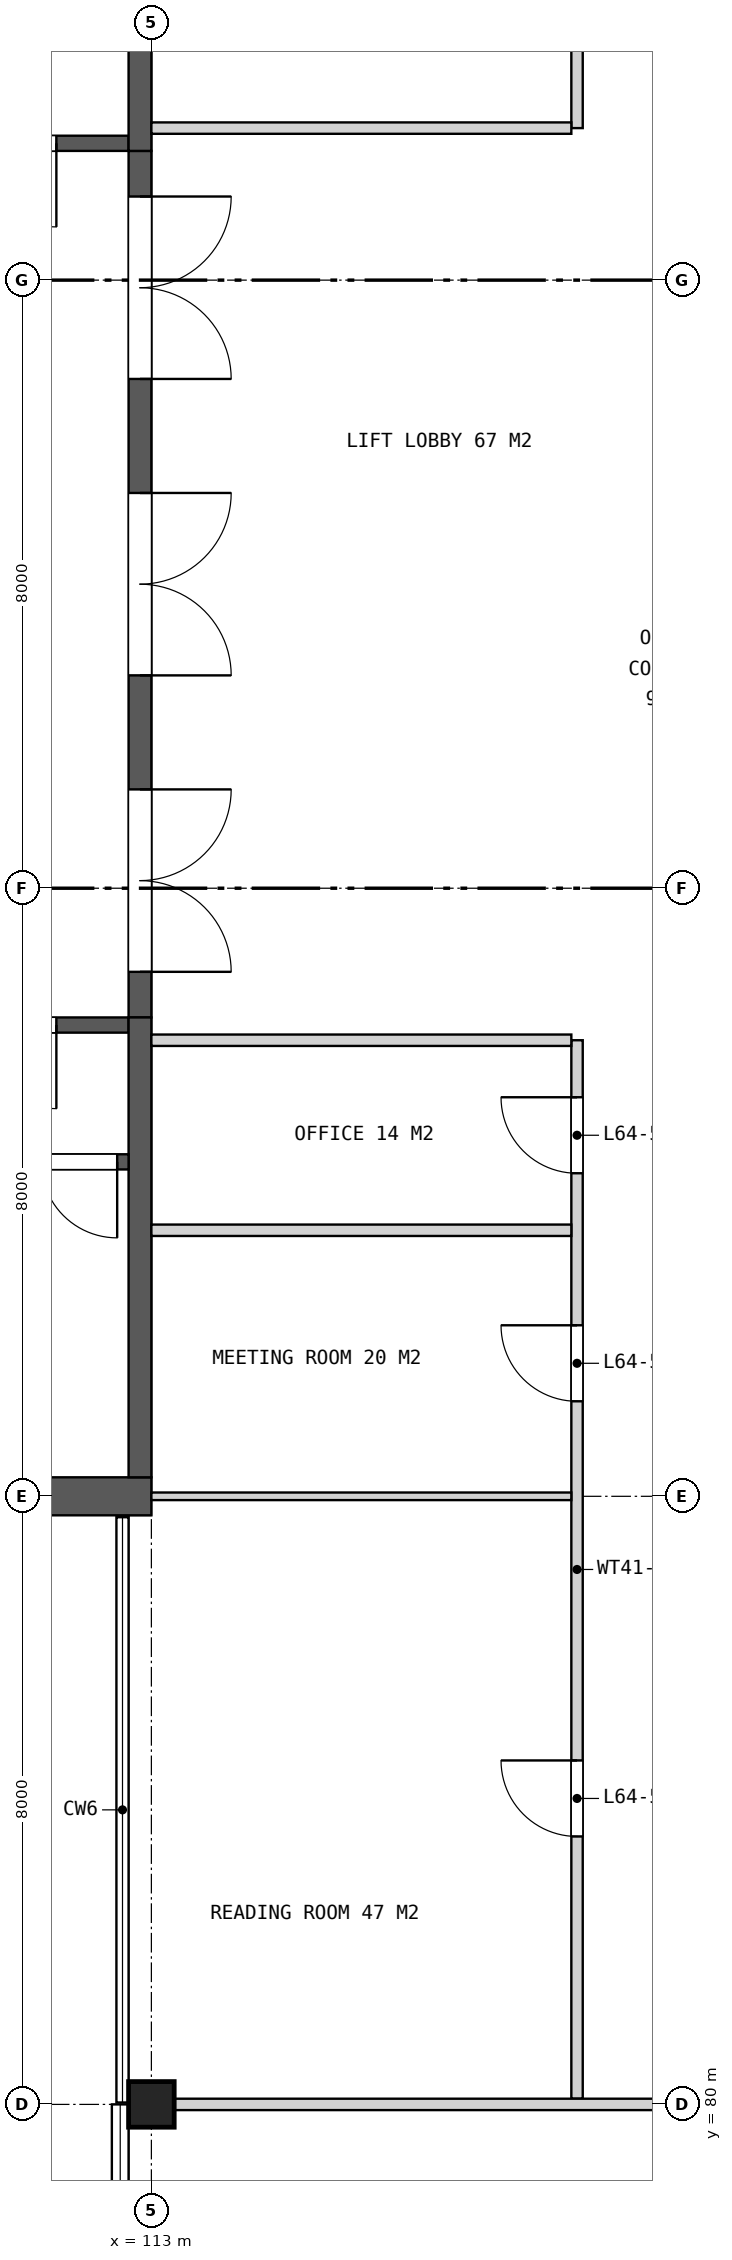
"""IFC4 building model, lengths in metres.
Left out: names, types, materials, properties, quantities, classifications, styles, units other than length and angle.
Written with IfcOpenShell. Run it as: python <this file> out.ifc"""

import sys

from ifc_helpers import new_model, si_unit, direction, frame, frame_2d, origin, origin_2d, place, context, subcontext, project, spatial, rectangle, extrude, element, fill, save


model = new_model("IFC4")
c1 = context("Model", 3, precision=1e-05, world=origin(), true_north=direction((0.0, 1.0)))
c2 = subcontext(c1, "Body", "Model", "MODEL_VIEW")
j1 = project(units=[si_unit("LENGTHUNIT", "METRE"), si_unit("PLANEANGLEUNIT", "RADIAN")], contexts=[c1])
p1 = place(None, origin())
s1 = spatial("IfcSite", under=j1, at=p1, CompositionType="ELEMENT")
p2 = place(p1, origin())
s2 = spatial("IfcBuilding", under=s1, at=p2, CompositionType="ELEMENT")
p3 = place(p2, frame((0.0, 0.0, 295.5)))
s3 = spatial("IfcBuildingStorey", under=s2, at=p3, CompositionType="ELEMENT", Elevation=295.5)
p4 = place(p3, frame((113.0, 80.0, 0.0), z_axis=(0.0, 0.0, 1.0), x_axis=(1.0, 0.0, 0.0)))
e1 = element("IfcColumn", 1, at=p4, inside=s3, PredefinedType="COLUMN", context=c2, shape_type="SweptSolid", body=[
    extrude(rectangle(XDim=0.6, YDim=0.6, at=origin_2d()), origin(), (0.0, 0.0, 1.0), 4.2),
])
p5 = place(p3, frame((113.0, 88.0, 0.0), z_axis=(0.0, 0.0, 1.0), x_axis=(-1.0, 0.0, 0.0)))
e2 = element("IfcWall", 2, at=p5, inside=s3, PredefinedType="SHEAR", context=c2, shape_type="SweptSolid", body=[
    extrude(rectangle(XDim=7.1, YDim=0.5, at=frame_2d((3.55, 0.0))), origin(), (0.0, 0.0, 1.0), 4.2),
])
p6 = place(p3, frame((112.85, 105.7, 0.0), z_axis=(0.0, 0.0, 1.0), x_axis=(0.0, -1.0, 0.0)))
e3 = element("IfcWall", 3, at=p6, inside=s3, PredefinedType="SHEAR", context=c2, shape_type="SweptSolid", body=[
    extrude(rectangle(XDim=11.4, YDim=0.3, at=frame_2d((5.7, 0.0))), origin(), (0.0, 0.0, 1.0), 4.2),
])
p7 = place(p6, frame((0.6, 0.0, 0.0)))
e4 = element("IfcOpeningElement", 4, at=p7, cuts=e3, PredefinedType="OPENING", context=c2, shape_type="SweptSolid", body=[
    extrude(rectangle(XDim=2.4, YDim=2.4, at=frame_2d((1.2, 1.2))), frame((0.0, 0.16, 0.0), z_axis=(0.0, -1.0, 0.0), x_axis=(1.0, 0.0, 0.0)), (0.0, 0.0, 1.0), 0.32),
])
p8 = place(p6, frame((4.5, 0.0, 0.0)))
e5 = element("IfcOpeningElement", 5, at=p8, cuts=e3, PredefinedType="OPENING", context=c2, shape_type="SweptSolid", body=[
    extrude(rectangle(XDim=2.4, YDim=2.4, at=frame_2d((1.2, 1.2))), frame((0.0, 0.16, 0.0), z_axis=(0.0, -1.0, 0.0), x_axis=(1.0, 0.0, 0.0)), (0.0, 0.0, 1.0), 0.32),
])
p9 = place(p6, frame((8.4, 0.0, 0.0)))
e6 = element("IfcOpeningElement", 6, at=p9, cuts=e3, PredefinedType="OPENING", context=c2, shape_type="SweptSolid", body=[
    extrude(rectangle(XDim=2.4, YDim=2.4, at=frame_2d((1.2, 1.2))), frame((0.0, 0.16, 0.0), z_axis=(0.0, -1.0, 0.0), x_axis=(1.0, 0.0, 0.0)), (0.0, 0.0, 1.0), 0.32),
])
p10 = place(p3, frame((112.7, 94.2, 0.0), z_axis=(0.0, 0.0, 1.0), x_axis=(-1.0, 0.0, 0.0)))
e7 = element("IfcWall", 7, at=p10, inside=s3, PredefinedType="SHEAR", context=c2, shape_type="SweptSolid", body=[
    extrude(rectangle(XDim=15.45, YDim=0.2, at=frame_2d((7.725, 0.0))), origin(), (0.0, 0.0, 1.0), 4.2),
])
p11 = place(p10, frame((0.95, 0.0, 0.0)))
e8 = element("IfcOpeningElement", 8, at=p11, cuts=e7, PredefinedType="OPENING", context=c2, shape_type="SweptSolid", body=[
    extrude(rectangle(XDim=1.1, YDim=2.1, at=frame_2d((0.55, 1.05))), frame((0.0, 0.11, 0.0), z_axis=(0.0, -1.0, 0.0), x_axis=(1.0, 0.0, 0.0)), (0.0, 0.0, 1.0), 0.22),
])
p12 = place(p3, frame((112.85, 94.3, 0.0), z_axis=(0.0, 0.0, 1.0), x_axis=(0.0, -1.0, 0.0)))
e9 = element("IfcWall", 9, at=p12, inside=s3, PredefinedType="SHEAR", context=c2, shape_type="SweptSolid", body=[
    extrude(rectangle(XDim=6.05, YDim=0.3, at=frame_2d((3.025, 0.0))), origin(), (0.0, 0.0, 1.0), 4.2),
])
p13 = place(p3, frame((112.7, 92.4, 0.0), z_axis=(0.0, 0.0, 1.0), x_axis=(-1.0, 0.0, 0.0)))
e10 = element("IfcWall", 10, at=p13, inside=s3, PredefinedType="SHEAR", context=c2, shape_type="SweptSolid", body=[
    extrude(rectangle(XDim=6.8, YDim=0.2, at=frame_2d((3.4, 0.0))), origin(), (0.0, 0.0, 1.0), 4.2),
])
p14 = place(p13, frame((0.15, 0.0, 0.0)))
e11 = element("IfcOpeningElement", 11, at=p14, cuts=e10, PredefinedType="OPENING", context=c2, shape_type="SweptSolid", body=[
    extrude(rectangle(XDim=1.0, YDim=2.1, at=frame_2d((0.5, 1.05))), frame((0.0, 0.11, 0.0), z_axis=(0.0, -1.0, 0.0), x_axis=(1.0, 0.0, 0.0)), (0.0, 0.0, 1.0), 0.22),
])
p15 = place(p3, frame((112.7, 105.8, 0.0), z_axis=(0.0, 0.0, 1.0), x_axis=(-1.0, 0.0, 0.0)))
e12 = element("IfcWall", 12, at=p15, inside=s3, PredefinedType="SHEAR", context=c2, shape_type="SweptSolid", body=[
    extrude(rectangle(XDim=15.45, YDim=0.2, at=frame_2d((7.725, 0.0))), origin(), (0.0, 0.0, 1.0), 4.2),
])
p16 = place(p15, frame((0.95, 0.0, 0.0)))
e13 = element("IfcOpeningElement", 13, at=p16, cuts=e12, PredefinedType="OPENING", context=c2, shape_type="SweptSolid", body=[
    extrude(rectangle(XDim=1.1, YDim=2.1, at=frame_2d((0.55, 1.05))), frame((0.0, 0.11, 0.0), z_axis=(0.0, -1.0, 0.0), x_axis=(1.0, 0.0, 0.0)), (0.0, 0.0, 1.0), 0.22),
])
p17 = place(p3, frame((112.85, 111.75, 0.0), z_axis=(0.0, 0.0, 1.0), x_axis=(0.0, -1.0, 0.0)))
e14 = element("IfcWall", 14, at=p17, inside=s3, PredefinedType="SHEAR", context=c2, shape_type="SweptSolid", body=[
    extrude(rectangle(XDim=6.05, YDim=0.3, at=frame_2d((3.025, 0.0))), origin(), (0.0, 0.0, 1.0), 4.2),
])
p18 = place(p3, frame((118.6, 80.075, 0.0), z_axis=(0.0, 0.0, 1.0), x_axis=(0.0, 1.0, 0.0)))
e15 = element("IfcWall", 15, at=p18, inside=s3, PredefinedType="PARTITIONING", context=c2, shape_type="SweptSolid", body=[
    extrude(rectangle(XDim=13.925, YDim=0.15, at=frame_2d((6.962, 0.0))), origin(), (0.0, 0.0, 1.0), 3.443),
])
p19 = place(p18, frame((12.175, 0.0, 0.0)))
e16 = element("IfcOpeningElement", 16, at=p19, cuts=e15, PredefinedType="OPENING", context=c2, shape_type="SweptSolid", body=[
    extrude(rectangle(XDim=1.0, YDim=2.1, at=frame_2d((0.5, 1.05))), frame((0.0, 0.085, 0.0), z_axis=(0.0, -1.0, 0.0), x_axis=(1.0, 0.0, 0.0)), (0.0, 0.0, 1.0), 0.17),
])
p20 = place(p18, frame((9.175, 0.0, 0.0)))
e17 = element("IfcOpeningElement", 17, at=p20, cuts=e15, PredefinedType="OPENING", context=c2, shape_type="SweptSolid", body=[
    extrude(rectangle(XDim=1.0, YDim=2.1, at=frame_2d((0.5, 1.05))), frame((0.0, 0.085, 0.0), z_axis=(0.0, -1.0, 0.0), x_axis=(1.0, 0.0, 0.0)), (0.0, 0.0, 1.0), 0.17),
])
p21 = place(p18, frame((3.45, 0.0, 0.0)))
e18 = element("IfcOpeningElement", 18, at=p21, cuts=e15, PredefinedType="OPENING", context=c2, shape_type="SweptSolid", body=[
    extrude(rectangle(XDim=1.0, YDim=2.1, at=frame_2d((0.5, 1.05))), frame((0.0, 0.085, 0.0), z_axis=(0.0, -1.0, 0.0), x_axis=(1.0, 0.0, 0.0)), (0.0, 0.0, 1.0), 0.17),
])
p22 = place(p3, frame((118.6, 106.0, 0.0), z_axis=(0.0, 0.0, 1.0), x_axis=(0.0, 1.0, 0.0)))
e19 = element("IfcWall", 19, at=p22, inside=s3, PredefinedType="PARTITIONING", context=c2, shape_type="SweptSolid", body=[
    extrude(rectangle(XDim=14.0, YDim=0.15, at=frame_2d((7.0, 0.0))), origin(), (0.0, 0.0, 1.0), 3.443),
])
p23 = place(p22, frame((6.05, 0.0, 0.0)))
e20 = element("IfcOpeningElement", 20, at=p23, cuts=e19, PredefinedType="OPENING", context=c2, shape_type="SweptSolid", body=[
    extrude(rectangle(XDim=1.8, YDim=2.1, at=frame_2d((0.9, 1.05))), frame((0.0, 0.085, 0.0), z_axis=(0.0, -1.0, 0.0), x_axis=(1.0, 0.0, 0.0)), (0.0, 0.0, 1.0), 0.17),
])
p24 = place(p3, frame((112.78, 80.0, 0.0), z_axis=(0.0, 0.0, 1.0), x_axis=(1.0, 0.0, 0.0)))
e21 = element("IfcWall", 21, at=p24, inside=s3, PredefinedType="PARTITIONING", context=c2, shape_type="SweptSolid", body=[
    extrude(rectangle(XDim=18.545, YDim=0.15, at=frame_2d((9.272, 0.0))), origin(), (0.0, 0.0, 1.0), 3.443),
])
p25 = place(p24, frame((11.27, 0.0, 0.0)))
e22 = element("IfcOpeningElement", 22, at=p25, cuts=e21, PredefinedType="OPENING", context=c2, shape_type="SweptSolid", body=[
    extrude(rectangle(XDim=1.8, YDim=2.1, at=frame_2d((0.9, 1.05))), frame((0.0, 0.085, 0.0), z_axis=(0.0, -1.0, 0.0), x_axis=(1.0, 0.0, 0.0)), (0.0, 0.0, 1.0), 0.17),
])
p26 = place(p3, frame((113.0, 88.0, 0.0), z_axis=(0.0, 0.0, 1.0), x_axis=(1.0, 0.0, 0.0)))
e23 = element("IfcWall", 23, at=p26, inside=s3, PredefinedType="PARTITIONING", context=c2, shape_type="SweptSolid", body=[
    extrude(rectangle(XDim=5.525, YDim=0.1, at=frame_2d((2.762, 0.0))), origin(), (0.0, 0.0, 1.0), 3.443),
])
for number, where, z_axis, x_axis in (
    (24, (113.0, 91.5, 0.0), (0.0, 0.0, 1.0), (1.0, 0.0, 0.0)),
    (25, (113.0, 94.0, 0.0), (0.0, 0.0, 1.0), (1.0, 0.0, 0.0)),
    (26, (113.0, 106.0, 0.0), (0.0, 0.0, 1.0), (1.0, 0.0, 0.0)),
):
    element("IfcWall", number, at=place(p3, frame(where, z_axis=z_axis, x_axis=x_axis)), inside=s3, PredefinedType="PARTITIONING", context=c2, shape_type="SweptSolid", body=[
        extrude(rectangle(XDim=5.525, YDim=0.15, at=frame_2d((2.762, 0.0))), origin(), (0.0, 0.0, 1.0), 3.443),
    ])
p27 = place(p7, origin())
e27 = element("IfcDoor", 27, at=p27, inside=s3, OperationType="DOUBLE_DOOR_SINGLE_SWING", PredefinedType="DOOR", context=c2, shape_type="SweptSolid", body=[
    extrude(rectangle(XDim=2.4, YDim=2.4, at=frame_2d((1.2, 1.2))), frame((0.0, 0.025, 0.0), z_axis=(0.0, -1.0, 0.0), x_axis=(1.0, 0.0, 0.0)), (0.0, 0.0, 1.0), 0.05),
])
fill(e4, e27)
p28 = place(p8, origin())
e28 = element("IfcDoor", 28, at=p28, inside=s3, OperationType="DOUBLE_DOOR_SINGLE_SWING", PredefinedType="DOOR", context=c2, shape_type="SweptSolid", body=[
    extrude(rectangle(XDim=2.4, YDim=2.4, at=frame_2d((1.2, 1.2))), frame((0.0, 0.025, 0.0), z_axis=(0.0, -1.0, 0.0), x_axis=(1.0, 0.0, 0.0)), (0.0, 0.0, 1.0), 0.05),
])
fill(e5, e28)
p29 = place(p9, origin())
e29 = element("IfcDoor", 29, at=p29, inside=s3, OperationType="DOUBLE_DOOR_SINGLE_SWING", PredefinedType="DOOR", context=c2, shape_type="SweptSolid", body=[
    extrude(rectangle(XDim=2.4, YDim=2.4, at=frame_2d((1.2, 1.2))), frame((0.0, 0.025, 0.0), z_axis=(0.0, -1.0, 0.0), x_axis=(1.0, 0.0, 0.0)), (0.0, 0.0, 1.0), 0.05),
])
fill(e6, e29)
p30 = place(p11, origin())
e30 = element("IfcDoor", 30, at=p30, inside=s3, OperationType="SINGLE_SWING_LEFT", PredefinedType="DOOR", context=c2, shape_type="SweptSolid", body=[
    extrude(rectangle(XDim=1.1, YDim=2.1, at=frame_2d((0.55, 1.05))), frame((0.0, 0.025, 0.0), z_axis=(0.0, -1.0, 0.0), x_axis=(1.0, 0.0, 0.0)), (0.0, 0.0, 1.0), 0.05),
])
fill(e8, e30)
p31 = place(p14, origin())
e31 = element("IfcDoor", 31, at=p31, inside=s3, OperationType="SINGLE_SWING_LEFT", PredefinedType="DOOR", context=c2, shape_type="SweptSolid", body=[
    extrude(rectangle(XDim=1.0, YDim=2.1, at=frame_2d((0.5, 1.05))), frame((0.0, 0.025, 0.0), z_axis=(0.0, -1.0, 0.0), x_axis=(1.0, 0.0, 0.0)), (0.0, 0.0, 1.0), 0.05),
])
fill(e11, e31)
p32 = place(p16, origin())
e32 = element("IfcDoor", 32, at=p32, inside=s3, OperationType="SINGLE_SWING_LEFT", PredefinedType="DOOR", context=c2, shape_type="SweptSolid", body=[
    extrude(rectangle(XDim=1.1, YDim=2.1, at=frame_2d((0.55, 1.05))), frame((0.0, 0.025, 0.0), z_axis=(0.0, -1.0, 0.0), x_axis=(1.0, 0.0, 0.0)), (0.0, 0.0, 1.0), 0.05),
])
fill(e13, e32)
p33 = place(p19, origin())
e33 = element("IfcDoor", 33, at=p33, inside=s3, OperationType="SINGLE_SWING_RIGHT", PredefinedType="DOOR", context=c2, shape_type="SweptSolid", body=[
    extrude(rectangle(XDim=1.0, YDim=2.1, at=frame_2d((0.5, 1.05))), frame((0.0, 0.025, 0.0), z_axis=(0.0, -1.0, 0.0), x_axis=(1.0, 0.0, 0.0)), (0.0, 0.0, 1.0), 0.05),
])
fill(e16, e33)
p34 = place(p20, origin())
e34 = element("IfcDoor", 34, at=p34, inside=s3, OperationType="SINGLE_SWING_RIGHT", PredefinedType="DOOR", context=c2, shape_type="SweptSolid", body=[
    extrude(rectangle(XDim=1.0, YDim=2.1, at=frame_2d((0.5, 1.05))), frame((0.0, 0.025, 0.0), z_axis=(0.0, -1.0, 0.0), x_axis=(1.0, 0.0, 0.0)), (0.0, 0.0, 1.0), 0.05),
])
fill(e17, e34)
p35 = place(p21, origin())
e35 = element("IfcDoor", 35, at=p35, inside=s3, OperationType="SINGLE_SWING_RIGHT", PredefinedType="DOOR", context=c2, shape_type="SweptSolid", body=[
    extrude(rectangle(XDim=1.0, YDim=2.1, at=frame_2d((0.5, 1.05))), frame((0.0, 0.025, 0.0), z_axis=(0.0, -1.0, 0.0), x_axis=(1.0, 0.0, 0.0)), (0.0, 0.0, 1.0), 0.05),
])
fill(e18, e35)
save(model, sys.argv[1])
